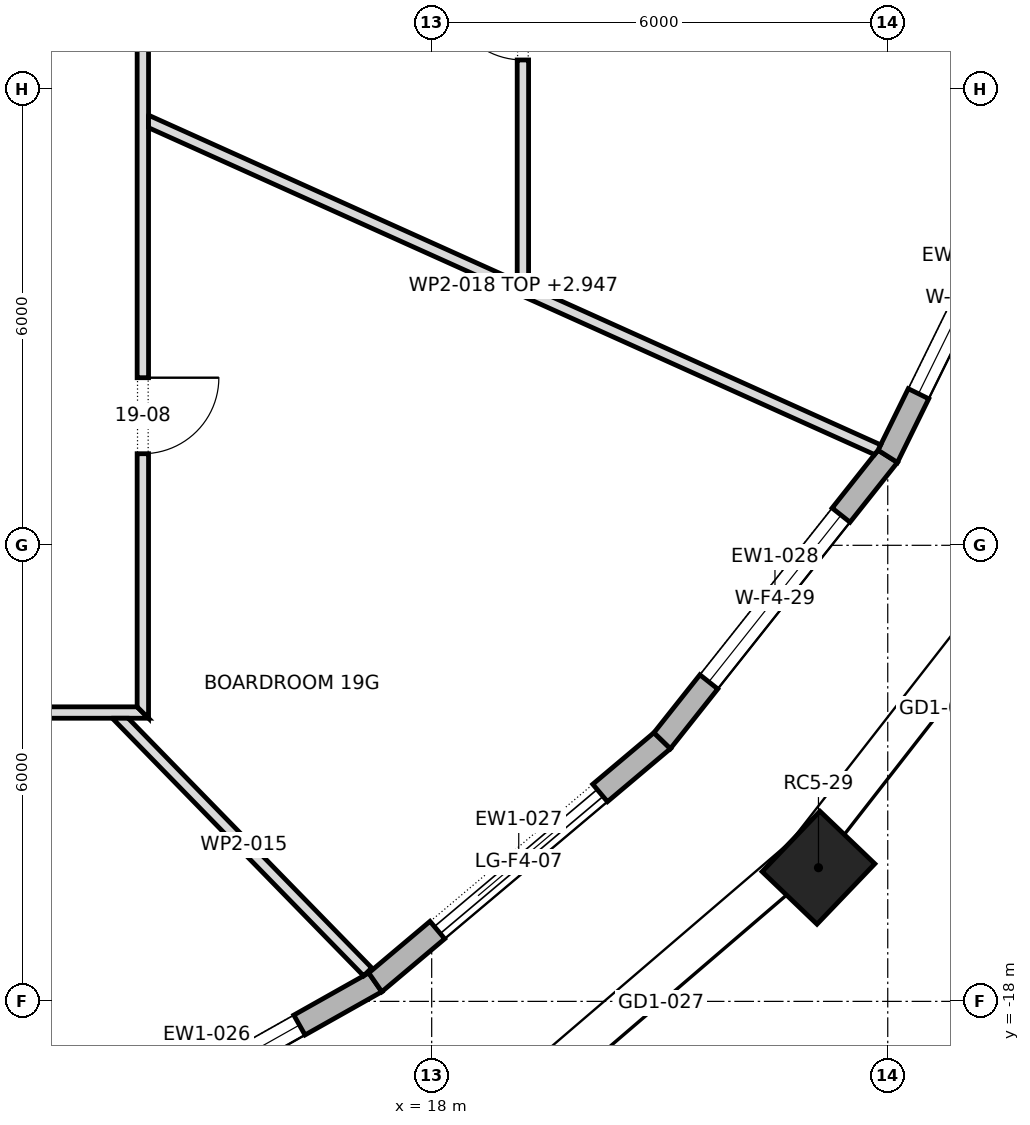
"""IFC4 building model, lengths in metres.
Left out: names, types, materials, properties, quantities, classifications, styles, units other than length and angle.
Written with IfcOpenShell. Run it as: python <this file> out.ifc"""

import sys

from ifc_helpers import new_model, si_unit, direction, frame, frame_2d, origin, origin_2d, place, context, subcontext, project, spatial, polyline, rectangle, outline, extrude, element, fill, save


model = new_model("IFC4")
c1 = context("Model", 3, precision=1e-05, world=origin(), true_north=direction((0.0, 1.0)))
c2 = subcontext(c1, "Body", "Model", "MODEL_VIEW")
j1 = project(units=[si_unit("LENGTHUNIT", "METRE"), si_unit("PLANEANGLEUNIT", "RADIAN")], contexts=[c1])
p1 = place(None, origin())
s1 = spatial("IfcSite", under=j1, at=p1, CompositionType="ELEMENT")
p2 = place(p1, origin())
s2 = spatial("IfcBuilding", under=s1, at=p2, CompositionType="ELEMENT")
p3 = place(p2, frame((0.0, 0.0, 268.3)))
s3 = spatial("IfcBuildingStorey", under=s2, at=p3, CompositionType="ELEMENT", Elevation=268.3)
p4 = place(p3, frame((23.089, -16.241, 0.0), z_axis=(0.0, 0.0, 1.0), x_axis=(0.69157987326, 0.722299992317, 0.0)))
e1 = element("IfcColumn", 1, at=p4, inside=s3, PredefinedType="COLUMN", context=c2, shape_type="SweptSolid", body=[
    extrude(rectangle(XDim=1.1, YDim=1.0, at=origin_2d()), origin(), (0.0, 0.0, 1.0), 4.0),
])
p5 = place(p3, frame((12.822, -20.246, 0.0), z_axis=(0.0, 0.0, 1.0), x_axis=(0.871433320402, 0.490513983585, 0.0)))
e2 = element("IfcWall", 2, at=p5, inside=s3, PredefinedType="STANDARD", context=c2, shape_type="SweptSolid", body=[
    extrude(outline(polyline([(-0.013, -0.15), (5.104, -0.15), (5.076, 0.15), (0.013, 0.15), (-0.013, -0.15)])), origin(), (0.0, 0.0, 1.0), 3.7),
])
p6 = place(p5, frame((1.145, 0.0, 0.6)))
e3 = element("IfcOpeningElement", 3, at=p6, cuts=e2, PredefinedType="OPENING", context=c2, shape_type="SweptSolid", body=[
    extrude(rectangle(XDim=2.8, YDim=2.65, at=frame_2d((1.4, 1.325))), frame((0.0, 0.162, 0.0), z_axis=(0.0, -1.0, 0.0), x_axis=(1.0, 0.0, 0.0)), (0.0, 0.0, 1.0), 0.324),
])
p7 = place(p3, frame((17.258, -17.75, 0.0), z_axis=(0.0, 0.0, 1.0), x_axis=(0.764832940795, 0.644228664897, 0.0)))
e4 = element("IfcWall", 4, at=p7, inside=s3, PredefinedType="STANDARD", context=c2, shape_type="SweptSolid", body=[
    extrude(outline(polyline([(-0.014, -0.15), (4.95, -0.15), (4.92, 0.15), (0.014, 0.15), (-0.014, -0.15)])), origin(), (0.0, 0.0, 1.0), 3.7),
])
p8 = place(p7, frame((1.068, 0.0, 0.0)))
e5 = element("IfcOpeningElement", 5, at=p8, cuts=e4, PredefinedType="OPENING", context=c2, shape_type="SweptSolid", body=[
    extrude(rectangle(XDim=2.8, YDim=3.25, at=frame_2d((1.4, 1.625))), frame((0.0, 0.162, 0.0), z_axis=(0.0, -1.0, 0.0), x_axis=(1.0, 0.0, 0.0)), (0.0, 0.0, 1.0), 0.324),
])
p9 = place(p3, frame((21.032, -14.57, 0.0), z_axis=(0.0, 0.0, 1.0), x_axis=(0.621434755851, 0.783465917715, 0.0)))
e6 = element("IfcWall", 6, at=p9, inside=s3, PredefinedType="STANDARD", context=c2, shape_type="SweptSolid", body=[
    extrude(outline(polyline([(-0.015, -0.15), (4.791, -0.15), (4.759, 0.15), (0.015, 0.15), (-0.015, -0.15)])), origin(), (0.0, 0.0, 1.0), 3.7),
])
p10 = place(p9, frame((0.987, 0.0, 0.6)))
e7 = element("IfcOpeningElement", 7, at=p10, cuts=e6, PredefinedType="OPENING", context=c2, shape_type="SweptSolid", body=[
    extrude(rectangle(XDim=2.8, YDim=2.65, at=frame_2d((1.4, 1.325))), frame((0.0, 0.162, 0.0), z_axis=(0.0, -1.0, 0.0), x_axis=(1.0, 0.0, 0.0)), (0.0, 0.0, 1.0), 0.324),
])
p11 = place(p3, frame((24.0, -10.829, 0.0), z_axis=(0.0, 0.0, 1.0), x_axis=(0.441261940724, 0.897378348117, 0.0)))
e8 = element("IfcWall", 8, at=p11, inside=s3, PredefinedType="STANDARD", context=c2, shape_type="SweptSolid", body=[
    extrude(outline(polyline([(-0.016, -0.15), (4.652, -0.15), (4.618, 0.15), (0.016, 0.15), (-0.016, -0.15)])), origin(), (0.0, 0.0, 1.0), 3.7),
])
p12 = place(p11, frame((0.917, 0.0, 0.6)))
e9 = element("IfcOpeningElement", 9, at=p12, cuts=e8, PredefinedType="OPENING", context=c2, shape_type="SweptSolid", body=[
    extrude(rectangle(XDim=2.8, YDim=2.65, at=frame_2d((1.4, 1.325))), frame((0.0, 0.162, 0.0), z_axis=(0.0, -1.0, 0.0), x_axis=(1.0, 0.0, 0.0)), (0.0, 0.0, 1.0), 0.324),
])
p13 = place(p3, frame((-14.275, -14.2, 0.0), z_axis=(0.0, 0.0, 1.0), x_axis=(1.0, 0.0, 0.0)))
e10 = element("IfcWall", 10, at=p13, inside=s3, PredefinedType="PARTITIONING", context=c2, shape_type="SweptSolid", body=[
    extrude(outline(polyline([(28.55, -0.075), (28.55, -0.075), (28.4, 0.075), (26.517, 0.075), (24.633, 0.075), (22.75, 0.075), (20.866, 0.075), (18.983, 0.075), (17.1, 0.075), (15.217, 0.075), (13.333, 0.075), (11.45, 0.075), (9.567, 0.075), (7.683, 0.075), (5.8, 0.075), (3.917, 0.075), (2.033, 0.075), (0.15, 0.075), (0.0, -0.075), (1.903, -0.075), (3.807, -0.075), (5.71, -0.075), (7.613, -0.075), (9.517, -0.075), (11.42, -0.075), (13.323, -0.075), (15.227, -0.075), (17.13, -0.075), (19.033, -0.075), (20.937, -0.075), (22.84, -0.075), (24.743, -0.075), (26.646, -0.075), (28.55, -0.075)])), origin(), (0.0, 0.0, 1.0), 3.7),
])
p14 = place(p13, frame((4.305, 0.0, 0.0)))
e11 = element("IfcOpeningElement", 11, at=p14, cuts=e10, PredefinedType="OPENING", context=c2, shape_type="SweptSolid", body=[
    extrude(rectangle(XDim=1.0, YDim=2.1, at=frame_2d((0.5, 1.05))), frame((0.0, 0.087, 0.0), z_axis=(0.0, -1.0, 0.0), x_axis=(1.0, 0.0, 0.0)), (0.0, 0.0, 1.0), 0.174),
])
p15 = place(p13, frame((17.735, 0.0, 0.0)))
e12 = element("IfcOpeningElement", 12, at=p15, cuts=e10, PredefinedType="OPENING", context=c2, shape_type="SweptSolid", body=[
    extrude(rectangle(XDim=1.8, YDim=2.1, at=frame_2d((0.9, 1.05))), frame((0.0, 0.087, 0.0), z_axis=(0.0, -1.0, 0.0), x_axis=(1.0, 0.0, 0.0)), (0.0, 0.0, 1.0), 0.174),
])
p16 = place(p3, frame((13.852, -14.223, 0.0), z_axis=(0.0, 0.0, 1.0), x_axis=(0.69820654799, -0.715896372629, 0.0)))
e13 = element("IfcWall", 13, at=p16, inside=s3, PredefinedType="PARTITIONING", context=c2, shape_type="SweptSolid", body=[
    extrude(outline(polyline([(0.0, -0.075), (1.578, -0.075), (3.156, -0.075), (4.734, -0.075), (4.734, -0.075), (4.734, 0.075), (3.205, 0.075), (1.675, 0.075), (0.146, 0.075), (0.0, -0.075), (0.0, -0.075)])), origin(), (0.0, 0.0, 1.0), 3.7),
])
p17 = place(p3, frame((14.2, -14.275, 0.0), z_axis=(0.0, 0.0, 1.0), x_axis=(0.0, 1.0, 0.0)))
e14 = element("IfcWall", 14, at=p17, inside=s3, PredefinedType="PARTITIONING", context=c2, shape_type="SweptSolid", body=[
    extrude(outline(polyline([(28.55, -0.075), (28.55, -0.075), (28.4, 0.075), (26.517, 0.075), (24.633, 0.075), (22.75, 0.075), (20.866, 0.075), (18.983, 0.075), (17.1, 0.075), (15.217, 0.075), (13.333, 0.075), (11.45, 0.075), (9.567, 0.075), (7.683, 0.075), (5.8, 0.075), (3.917, 0.075), (2.033, 0.075), (0.15, 0.075), (0.0, -0.075), (1.903, -0.075), (3.807, -0.075), (5.71, -0.075), (7.613, -0.075), (9.517, -0.075), (11.42, -0.075), (13.323, -0.075), (15.227, -0.075), (17.13, -0.075), (19.033, -0.075), (20.937, -0.075), (22.84, -0.075), (24.743, -0.075), (26.646, -0.075), (28.55, -0.075)])), origin(), (0.0, 0.0, 1.0), 3.7),
])
p18 = place(p17, frame((3.48, 0.0, 0.0)))
e15 = element("IfcOpeningElement", 15, at=p18, cuts=e14, PredefinedType="OPENING", context=c2, shape_type="SweptSolid", body=[
    extrude(rectangle(XDim=1.0, YDim=2.1, at=frame_2d((0.5, 1.05))), frame((0.0, 0.087, 0.0), z_axis=(0.0, -1.0, 0.0), x_axis=(1.0, 0.0, 0.0)), (0.0, 0.0, 1.0), 0.174),
])
p19 = place(p17, frame((9.99, 0.0, 0.0)))
e16 = element("IfcOpeningElement", 16, at=p19, cuts=e14, PredefinedType="OPENING", context=c2, shape_type="SweptSolid", body=[
    extrude(rectangle(XDim=1.0, YDim=2.1, at=frame_2d((0.5, 1.05))), frame((0.0, 0.087, 0.0), z_axis=(0.0, -1.0, 0.0), x_axis=(1.0, 0.0, 0.0)), (0.0, 0.0, 1.0), 0.174),
])
p20 = place(p17, frame((15.0, 0.0, 0.0)))
e17 = element("IfcOpeningElement", 17, at=p20, cuts=e14, PredefinedType="OPENING", context=c2, shape_type="SweptSolid", body=[
    extrude(rectangle(XDim=1.0, YDim=2.1, at=frame_2d((0.5, 1.05))), frame((0.0, 0.087, 0.0), z_axis=(0.0, -1.0, 0.0), x_axis=(1.0, 0.0, 0.0)), (0.0, 0.0, 1.0), 0.174),
])
p21 = place(p17, frame((22.69, 0.0, 0.0)))
e18 = element("IfcOpeningElement", 18, at=p21, cuts=e14, PredefinedType="OPENING", context=c2, shape_type="SweptSolid", body=[
    extrude(rectangle(XDim=1.0, YDim=2.1, at=frame_2d((0.5, 1.05))), frame((0.0, 0.087, 0.0), z_axis=(0.0, -1.0, 0.0), x_axis=(1.0, 0.0, 0.0)), (0.0, 0.0, 1.0), 0.174),
])
p22 = place(p3, frame((14.245, -6.41, 0.0), z_axis=(0.0, 0.0, 1.0), x_axis=(0.91183931518, -0.410547272908, 0.0)))
e19 = element("IfcWall", 19, at=p22, inside=s3, PredefinedType="PARTITIONING", context=c2, shape_type="SweptSolid", body=[
    extrude(outline(polyline([(0.067, -0.075), (1.813, -0.075), (3.559, -0.075), (5.304, -0.075), (7.05, -0.075), (8.796, -0.075), (10.542, -0.075), (10.56, -0.003), (10.562, 0.073), (10.562, 0.075), (8.816, 0.075), (7.07, 0.075), (5.324, 0.075), (5.319, 0.073), (5.318, 0.075), (3.546, 0.075), (1.773, 0.075), (0.0, 0.075), (0.0, 0.074), (0.067, -0.075)])), origin(), (0.0, 0.0, 1.0), 2.947),
])
p23 = place(p3, frame((19.2, -1.664, 0.0), z_axis=(0.0, 0.0, 1.0), x_axis=(0.0, -1.0, 0.0)))
e20 = element("IfcWall", 20, at=p23, inside=s3, PredefinedType="PARTITIONING", context=c2, shape_type="SweptSolid", body=[
    extrude(outline(polyline([(0.0, -0.075), (1.715, -0.075), (3.431, -0.075), (5.146, -0.075), (6.862, -0.075), (6.929, 0.074), (6.929, 0.075), (5.2, 0.075), (3.47, 0.075), (1.741, 0.075), (0.012, 0.075), (0.0, -0.07), (0.0, -0.075)])), origin(), (0.0, 0.0, 1.0), 3.7),
])
p24 = place(p23, frame((2.951, 0.0, 0.0)))
e21 = element("IfcOpeningElement", 21, at=p24, cuts=e20, PredefinedType="OPENING", context=c2, shape_type="SweptSolid", body=[
    extrude(rectangle(XDim=1.0, YDim=2.1, at=frame_2d((0.5, 1.05))), frame((0.0, 0.087, 0.0), z_axis=(0.0, -1.0, 0.0), x_axis=(1.0, 0.0, 0.0)), (0.0, 0.0, 1.0), 0.174),
])
p25 = place(p6, origin())
e22 = element("IfcWindow", 22, at=p25, inside=s3, PartitioningType="DOUBLE_PANEL_VERTICAL", PredefinedType="WINDOW", context=c2, shape_type="SweptSolid", body=[
    extrude(rectangle(XDim=2.8, YDim=2.65, at=frame_2d((1.4, 1.325))), frame((0.0, 0.03, 0.0), z_axis=(0.0, -1.0, 0.0), x_axis=(1.0, 0.0, 0.0)), (0.0, 0.0, 1.0), 0.06),
])
fill(e3, e22)
p26 = place(p8, origin())
e23 = element("IfcDoor", 23, at=p26, inside=s3, OperationType="DOUBLE_DOOR_SLIDING", PredefinedType="DOOR", context=c2, shape_type="SweptSolid", body=[
    extrude(rectangle(XDim=2.8, YDim=3.25, at=frame_2d((1.4, 1.625))), frame((0.0, 0.025, 0.0), z_axis=(0.0, -1.0, 0.0), x_axis=(1.0, 0.0, 0.0)), (0.0, 0.0, 1.0), 0.05),
])
fill(e5, e23)
p27 = place(p10, origin())
e24 = element("IfcWindow", 24, at=p27, inside=s3, PartitioningType="DOUBLE_PANEL_VERTICAL", PredefinedType="WINDOW", context=c2, shape_type="SweptSolid", body=[
    extrude(rectangle(XDim=2.8, YDim=2.65, at=frame_2d((1.4, 1.325))), frame((0.0, 0.03, 0.0), z_axis=(0.0, -1.0, 0.0), x_axis=(1.0, 0.0, 0.0)), (0.0, 0.0, 1.0), 0.06),
])
fill(e7, e24)
p28 = place(p12, origin())
e25 = element("IfcWindow", 25, at=p28, inside=s3, PartitioningType="DOUBLE_PANEL_VERTICAL", PredefinedType="WINDOW", context=c2, shape_type="SweptSolid", body=[
    extrude(rectangle(XDim=2.8, YDim=2.65, at=frame_2d((1.4, 1.325))), frame((0.0, 0.03, 0.0), z_axis=(0.0, -1.0, 0.0), x_axis=(1.0, 0.0, 0.0)), (0.0, 0.0, 1.0), 0.06),
])
fill(e9, e25)
p29 = place(p18, frame((1.0, 0.0, 0.0), z_axis=(0.0, 0.0, 1.0), x_axis=(-1.0, 0.0, 0.0)))
e26 = element("IfcDoor", 26, at=p29, inside=s3, OperationType="SINGLE_SWING_RIGHT", PredefinedType="DOOR", context=c2, shape_type="SweptSolid", body=[
    extrude(rectangle(XDim=1.0, YDim=2.1, at=frame_2d((0.5, 1.05))), frame((0.0, 0.025, 0.0), z_axis=(0.0, -1.0, 0.0), x_axis=(1.0, 0.0, 0.0)), (0.0, 0.0, 1.0), 0.05),
])
fill(e15, e26)
p30 = place(p24, frame((1.0, 0.0, 0.0), z_axis=(0.0, 0.0, 1.0), x_axis=(-1.0, 0.0, 0.0)))
e27 = element("IfcDoor", 27, at=p30, inside=s3, OperationType="SINGLE_SWING_LEFT", PredefinedType="DOOR", context=c2, shape_type="SweptSolid", body=[
    extrude(rectangle(XDim=1.0, YDim=2.1, at=frame_2d((0.5, 1.05))), frame((0.0, 0.025, 0.0), z_axis=(0.0, -1.0, 0.0), x_axis=(1.0, 0.0, 0.0)), (0.0, 0.0, 1.0), 0.05),
])
fill(e21, e27)
save(model, sys.argv[1])
